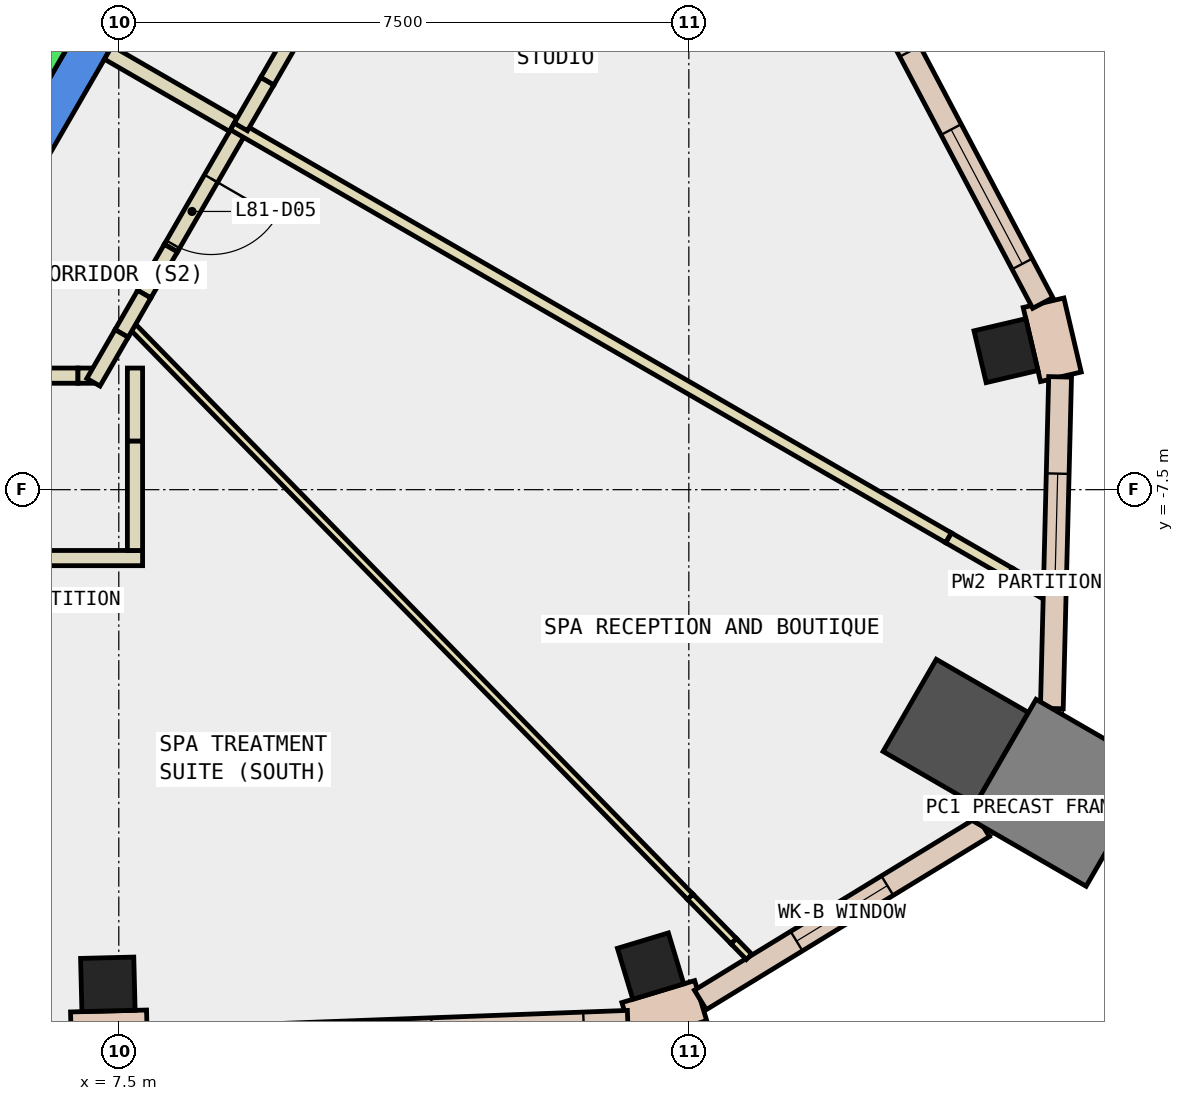
"""IFC4 building model, lengths in metres.
Left out: names, types, materials, properties, quantities, classifications, styles, units other than length and angle.
Written with IfcOpenShell. Run it as: python <this file> out.ifc"""

import sys

from ifc_helpers import new_model, si_unit, direction, frame, frame_2d, origin, origin_2d, place, context, subcontext, project, spatial, polyline, rectangle, outline, extrude, element, fill, save


model = new_model("IFC4")
c1 = context("Model", 3, precision=1e-05, world=origin(), true_north=direction((0.0, 1.0)))
c2 = subcontext(c1, "Body", "Model", "MODEL_VIEW")
j1 = project(units=[si_unit("LENGTHUNIT", "METRE"), si_unit("PLANEANGLEUNIT", "RADIAN")], contexts=[c1])
p1 = place(None, origin())
s1 = spatial("IfcSite", under=j1, at=p1, CompositionType="ELEMENT")
p2 = place(p1, origin())
s2 = spatial("IfcBuilding", under=s1, at=p2, CompositionType="ELEMENT")
p3 = place(p2, frame((0.0, 0.0, 344.9)))
s3 = spatial("IfcBuildingStorey", under=s2, at=p3, CompositionType="ELEMENT", Elevation=344.9)
for number, where, z_axis, x_axis in (
    (1, (7.356, -14.008, -0.35), (0.0, 0.0, 1.0), (1.0, 0.025, 0.0)),
    (2, (14.497, -13.768, -0.35), (0.0, 0.0, 1.0), (0.957, 0.289, 0.0)),
):
    element("IfcColumn", number, at=place(p3, frame(where, z_axis=z_axis, x_axis=x_axis)), inside=s3, PredefinedType="COLUMN", context=c2, shape_type="SweptSolid", body=[
        extrude(rectangle(XDim=0.7, YDim=0.7, at=origin_2d()), origin(), (0.0, 0.0, 1.0), 4.4),
    ])
p4 = place(p3, frame((18.512, -10.688, -0.35), z_axis=(0.0, 0.0, 1.0), x_axis=(-0.866025403784, 0.5, 0.0)))
e3 = element("IfcColumn", 3, at=p4, inside=s3, PredefinedType="COLUMN", context=c2, shape_type="SweptSolid", body=[
    extrude(rectangle(XDim=1.4, YDim=1.4, at=origin_2d()), origin(), (0.0, 0.0, 1.0), 4.4),
])
p5 = place(p3, frame((19.173, -5.671, -0.35), z_axis=(0.0, 0.0, 1.0), x_axis=(-0.228435830028, 0.973558971793, 0.0)))
e4 = element("IfcColumn", 4, at=p5, inside=s3, PredefinedType="COLUMN", context=c2, shape_type="SweptSolid", body=[
    extrude(rectangle(XDim=0.7, YDim=0.7, at=origin_2d()), origin(), (0.0, 0.0, 1.0), 4.4),
])
p6 = place(p3, frame((19.898, -11.488, -0.35), z_axis=(0.0, 0.0, 1.0), x_axis=(-0.866025403784, 0.5, 0.0)))
e5 = element("IfcColumn", 5, at=p6, inside=s3, PredefinedType="COLUMN", context=c2, shape_type="SweptSolid", body=[
    extrude(rectangle(XDim=1.8, YDim=1.8, at=origin_2d()), origin(), (0.0, 0.0, 1.0), 4.4),
])
p7 = place(p3, frame((0.0, 0.0, -0.35)))
e6 = element("IfcWall", 6, at=p7, inside=s3, PredefinedType="SHEAR", context=c2, shape_type="SweptSolid", body=[
    extrude(outline(polyline([(4.907, -6.0), (9.815, 2.5), (9.238, 2.5), (4.619, -5.5), (4.907, -6.0)])), origin(), (0.0, 0.0, 1.0), 4.4),
])
for number, where, z_axis, x_axis in (
    (7, (19.895, -6.015, 0.0), (0.0, 0.0, 1.0), (-0.228, 0.974, 0.0)),
    (8, (6.872, -14.646, 0.0), (0.0, 0.0, 1.0), (1.0, 0.025, 0.0)),
):
    element("IfcWall", number, at=place(p3, frame(where, z_axis=z_axis, x_axis=x_axis)), inside=s3, PredefinedType="STANDARD", context=c2, shape_type="SweptSolid", body=[
        extrude(rectangle(XDim=1.0, YDim=0.55, at=frame_2d((0.5, 0.0))), origin(), (0.0, 0.0, 1.0), 4.05),
    ])
p8 = place(p3, frame((14.199, -14.511, 0.0), z_axis=(0.0, 0.0, 1.0), x_axis=(0.957286907321, 0.289139718946, 0.0)))
e9 = element("IfcWall", 9, at=p8, inside=s3, PredefinedType="STANDARD", context=c2, shape_type="SweptSolid", body=[
    extrude(rectangle(XDim=1.0, YDim=0.55, at=frame_2d((0.5, 0.0))), origin(), (0.0, 0.0, 1.0), 4.05),
])
p9 = place(p3, frame((7.874, -14.739, 0.0), z_axis=(0.0, 0.0, 1.0), x_axis=(0.999292132587, 0.03761959262, 0.0)))
e10 = element("IfcWall", 10, at=p9, inside=s3, PredefinedType="STANDARD", context=c2, shape_type="SweptSolid", body=[
    extrude(rectangle(XDim=6.327, YDim=0.3, at=frame_2d((3.164, 0.0))), origin(), (0.0, 0.0, 1.0), 4.05),
])
p10 = place(p9, frame((0.582, 0.0, 0.9)))
e11 = element("IfcOpeningElement", 11, at=p10, cuts=e10, PredefinedType="OPENING", context=c2, shape_type="SweptSolid", body=[
    extrude(rectangle(XDim=2.0, YDim=3.0, at=frame_2d((1.0, 1.5))), frame((0.0, 0.16, 0.0), z_axis=(0.0, -1.0, 0.0), x_axis=(1.0, 0.0, 0.0)), (0.0, 0.0, 1.0), 0.32),
])
p11 = place(p9, frame((3.746, 0.0, 0.9)))
e12 = element("IfcOpeningElement", 12, at=p11, cuts=e10, PredefinedType="OPENING", context=c2, shape_type="SweptSolid", body=[
    extrude(rectangle(XDim=2.0, YDim=3.0, at=frame_2d((1.0, 1.5))), frame((0.0, 0.16, 0.0), z_axis=(0.0, -1.0, 0.0), x_axis=(1.0, 0.0, 0.0)), (0.0, 0.0, 1.0), 0.32),
])
p12 = place(p3, frame((15.152, -14.213, 0.0), z_axis=(0.0, 0.0, 1.0), x_axis=(0.853225151066, 0.521542751448, 0.0)))
e13 = element("IfcWall", 13, at=p12, inside=s3, PredefinedType="STANDARD", context=c2, shape_type="SweptSolid", body=[
    extrude(rectangle(XDim=4.366, YDim=0.3, at=frame_2d((2.183, 0.0))), origin(), (0.0, 0.0, 1.0), 4.05),
])
p13 = place(p12, frame((1.483, 0.0, 0.9)))
e14 = element("IfcOpeningElement", 14, at=p13, cuts=e13, PredefinedType="OPENING", context=c2, shape_type="SweptSolid", body=[
    extrude(rectangle(XDim=1.4, YDim=3.0, at=frame_2d((0.7, 1.5))), frame((0.0, 0.16, 0.0), z_axis=(0.0, -1.0, 0.0), x_axis=(1.0, 0.0, 0.0)), (0.0, 0.0, 1.0), 0.32),
])
p14 = place(p3, frame((19.776, -10.379, 0.0), z_axis=(0.0, 0.0, 1.0), x_axis=(0.025006167975, 0.99968729689, 0.0)))
e15 = element("IfcWall", 15, at=p14, inside=s3, PredefinedType="STANDARD", context=c2, shape_type="SweptSolid", body=[
    extrude(rectangle(XDim=4.364, YDim=0.3, at=frame_2d((2.182, 0.0))), origin(), (0.0, 0.0, 1.0), 4.05),
])
p15 = place(p14, frame((1.691, 0.0, 0.9)))
e16 = element("IfcOpeningElement", 16, at=p15, cuts=e15, PredefinedType="OPENING", context=c2, shape_type="SweptSolid", body=[
    extrude(rectangle(XDim=1.4, YDim=3.0, at=frame_2d((0.7, 1.5))), frame((0.0, 0.16, 0.0), z_axis=(0.0, -1.0, 0.0), x_axis=(1.0, 0.0, 0.0)), (0.0, 0.0, 1.0), 0.32),
])
p16 = place(p3, frame((19.657, -5.044, 0.0), z_axis=(0.0, 0.0, 1.0), x_axis=(-0.467155191513, 0.884175337274, 0.0)))
e17 = element("IfcWall", 17, at=p16, inside=s3, PredefinedType="STANDARD", context=c2, shape_type="SweptSolid", body=[
    extrude(rectangle(XDim=6.326, YDim=0.3, at=frame_2d((3.163, 0.0))), origin(), (0.0, 0.0, 1.0), 4.05),
])
p17 = place(p16, frame((0.581, 0.0, 0.9)))
e18 = element("IfcOpeningElement", 18, at=p17, cuts=e17, PredefinedType="OPENING", context=c2, shape_type="SweptSolid", body=[
    extrude(rectangle(XDim=2.0, YDim=3.0, at=frame_2d((1.0, 1.5))), frame((0.0, 0.16, 0.0), z_axis=(0.0, -1.0, 0.0), x_axis=(1.0, 0.0, 0.0)), (0.0, 0.0, 1.0), 0.32),
])
p18 = place(p16, frame((3.744, 0.0, 0.9)))
e19 = element("IfcOpeningElement", 19, at=p18, cuts=e17, PredefinedType="OPENING", context=c2, shape_type="SweptSolid", body=[
    extrude(rectangle(XDim=2.0, YDim=3.0, at=frame_2d((1.0, 1.5))), frame((0.0, 0.16, 0.0), z_axis=(0.0, -1.0, 0.0), x_axis=(1.0, 0.0, 0.0)), (0.0, 0.0, 1.0), 0.32),
])
p19 = place(p3, frame((7.813, -8.4, 0.0), z_axis=(0.0, 0.0, 1.0), x_axis=(-1.0, 0.0, 0.0)))
e20 = element("IfcWall", 20, at=p19, inside=s3, PredefinedType="PARTITIONING", context=c2, shape_type="SweptSolid", body=[
    extrude(rectangle(XDim=2.567, YDim=0.2, at=frame_2d((1.283, 0.0))), origin(), (0.0, 0.0, 1.0), 4.05),
])
p20 = place(p19, frame((1.489, 0.0, 0.0)))
e21 = element("IfcOpeningElement", 21, at=p20, cuts=e20, PredefinedType="OPENING", context=c2, shape_type="SweptSolid", body=[
    extrude(rectangle(XDim=1.0, YDim=2.1, at=frame_2d((0.5, 1.05))), frame((0.0, 0.11, 0.0), z_axis=(0.0, -1.0, 0.0), x_axis=(1.0, 0.0, 0.0)), (0.0, 0.0, 1.0), 0.22),
])
p21 = place(p3, frame((7.713, -5.9, 0.0), z_axis=(0.0, 0.0, 1.0), x_axis=(0.0, -1.0, 0.0)))
e22 = element("IfcWall", 22, at=p21, inside=s3, PredefinedType="PARTITIONING", context=c2, shape_type="SweptSolid", body=[
    extrude(rectangle(XDim=0.962, YDim=0.2, at=frame_2d((0.481, 0.0))), origin(), (0.0, 0.0, 1.0), 1.95),
])
p22 = place(p3, frame((9.106, -2.728, 0.0), z_axis=(0.0, 0.0, 1.0), x_axis=(-0.500246664097, -0.865882945357, 0.0)))
e23 = element("IfcWall", 23, at=p22, inside=s3, PredefinedType="PARTITIONING", context=c2, shape_type="SweptSolid", body=[
    extrude(rectangle(XDim=1.841, YDim=0.2, at=frame_2d((0.92, 0.0))), origin(), (0.0, 0.0, 1.0), 4.05),
])
p23 = place(p22, frame((0.784, 0.0, 0.0)))
e24 = element("IfcOpeningElement", 24, at=p23, cuts=e23, PredefinedType="OPENING", context=c2, shape_type="SweptSolid", body=[
    extrude(rectangle(XDim=1.0, YDim=2.1, at=frame_2d((0.5, 1.05))), frame((0.0, 0.11, 0.0), z_axis=(0.0, -1.0, 0.0), x_axis=(1.0, 0.0, 0.0)), (0.0, 0.0, 1.0), 0.22),
])
p24 = place(p3, frame((7.361, -1.75, 0.0), z_axis=(0.0, 0.0, 1.0), x_axis=(0.865980106173, -0.500078449558, 0.0)))
e25 = element("IfcWall", 25, at=p24, inside=s3, PredefinedType="PARTITIONING", context=c2, shape_type="SweptSolid", body=[
    extrude(rectangle(XDim=1.9, YDim=0.2, at=frame_2d((0.95, 0.0))), origin(), (0.0, 0.0, 1.0), 4.05),
])
p25 = place(p3, frame((7.624, -5.295, 0.0), z_axis=(0.0, 0.0, 1.0), x_axis=(0.699214658751, -0.714911785458, 0.0)))
e26 = element("IfcWall", 26, at=p25, inside=s3, PredefinedType="PARTITIONING", context=c2, shape_type="SweptSolid", body=[
    extrude(rectangle(XDim=10.576, YDim=0.1, at=frame_2d((5.288, 0.0))), origin(), (0.0, 0.0, 1.0), 4.05),
])
p26 = place(p3, frame((19.664, -8.853, 0.0), z_axis=(0.0, 0.0, 1.0), x_axis=(-0.866272785837, 0.499571276714, 0.0)))
e27 = element("IfcWall", 27, at=p26, inside=s3, PredefinedType="PARTITIONING", context=c2, shape_type="SweptSolid", body=[
    extrude(rectangle(XDim=0.513, YDim=0.15, at=frame_2d((0.256, 0.0))), origin(), (0.0, 0.0, 1.0), 4.05),
])
p27 = place(p3, frame((5.076, -6.0, 0.0), z_axis=(0.0, 0.0, 1.0), x_axis=(1.0, 0.0, 0.0)))
e28 = element("IfcWall", 28, at=p27, inside=s3, PredefinedType="PARTITIONING", context=c2, shape_type="SweptSolid", body=[
    extrude(rectangle(XDim=1.887, YDim=0.2, at=frame_2d((0.943, 0.0))), origin(), (0.0, 0.0, 1.0), 4.05),
])
p28 = place(p27, frame((0.336, 0.0, 0.0)))
e29 = element("IfcOpeningElement", 29, at=p28, cuts=e28, PredefinedType="OPENING", context=c2, shape_type="SweptSolid", body=[
    extrude(rectangle(XDim=1.0, YDim=2.1, at=frame_2d((0.5, 1.05))), frame((0.0, 0.11, 0.0), z_axis=(0.0, -1.0, 0.0), x_axis=(1.0, 0.0, 0.0)), (0.0, 0.0, 1.0), 0.22),
])
p29 = place(p3, frame((6.963, -6.0, 0.0), z_axis=(0.0, 0.0, 1.0), x_axis=(1.0, 0.0, 0.0)))
e30 = element("IfcWall", 30, at=p29, inside=s3, PredefinedType="PARTITIONING", context=c2, shape_type="SweptSolid", body=[
    extrude(rectangle(XDim=0.198, YDim=0.2, at=frame_2d((0.099, 0.0))), origin(), (0.0, 0.0, 1.0), 1.95),
])
p30 = place(p3, frame((7.713, -6.862, 0.0), z_axis=(0.0, 0.0, 1.0), x_axis=(0.0, -1.0, 0.0)))
e31 = element("IfcWall", 31, at=p30, inside=s3, PredefinedType="PARTITIONING", context=c2, shape_type="SweptSolid", body=[
    extrude(rectangle(XDim=1.438, YDim=0.2, at=frame_2d((0.719, 0.0))), origin(), (0.0, 0.0, 1.0), 4.05),
])
p31 = place(p3, frame((8.185, -4.322, 0.0), z_axis=(0.0, 0.0, 1.0), x_axis=(-0.500265973451, -0.865871789474, 0.0)))
e32 = element("IfcWall", 32, at=p31, inside=s3, PredefinedType="PARTITIONING", context=c2, shape_type="SweptSolid", body=[
    extrude(rectangle(XDim=0.7, YDim=0.2, at=frame_2d((0.35, 0.0))), origin(), (0.0, 0.0, 1.0), 1.95),
])
p32 = place(p3, frame((7.835, -4.928, 0.0), z_axis=(0.0, 0.0, 1.0), x_axis=(-0.499132035552, -0.866525943689, 0.0)))
e33 = element("IfcWall", 33, at=p32, inside=s3, PredefinedType="PARTITIONING", context=c2, shape_type="SweptSolid", body=[
    extrude(rectangle(XDim=0.597, YDim=0.2, at=frame_2d((0.298, 0.0))), origin(), (0.0, 0.0, 1.0), 4.05),
])
p33 = place(p3, frame((7.537, -5.445, 0.0), z_axis=(0.0, 0.0, 1.0), x_axis=(-0.500529943435, -0.865719224533, 0.0)))
e34 = element("IfcWall", 34, at=p33, inside=s3, PredefinedType="PARTITIONING", context=c2, shape_type="SweptSolid", body=[
    extrude(rectangle(XDim=0.741, YDim=0.2, at=frame_2d((0.371, 0.0))), origin(), (0.0, 0.0, 1.0), 1.95),
])
p34 = place(p3, frame((15.019, -12.856, 0.0), z_axis=(0.0, 0.0, 1.0), x_axis=(0.699751841197, -0.714386002622, 0.0)))
e35 = element("IfcWall", 35, at=p34, inside=s3, PredefinedType="PARTITIONING", context=c2, shape_type="SweptSolid", body=[
    extrude(rectangle(XDim=0.817, YDim=0.1, at=frame_2d((0.409, 0.0))), origin(), (0.0, 0.0, 1.0), 1.95),
])
p35 = place(p3, frame((15.591, -13.44, 0.0), z_axis=(0.0, 0.0, 1.0), x_axis=(0.698143623014, -0.715957737332, 0.0)))
e36 = element("IfcWall", 36, at=p35, inside=s3, PredefinedType="PARTITIONING", context=c2, shape_type="SweptSolid", body=[
    extrude(rectangle(XDim=0.288, YDim=0.1, at=frame_2d((0.144, 0.0))), origin(), (0.0, 0.0, 1.0), 4.05),
])
p36 = place(p3, frame((19.22, -8.597, 0.0), z_axis=(0.0, 0.0, 1.0), x_axis=(-0.866163690229, 0.499760404323, 0.0)))
e37 = element("IfcWall", 37, at=p36, inside=s3, PredefinedType="PARTITIONING", context=c2, shape_type="SweptSolid", body=[
    extrude(rectangle(XDim=0.928, YDim=0.15, at=frame_2d((0.464, 0.0))), origin(), (0.0, 0.0, 1.0), 1.95),
])
p37 = place(p3, frame((18.416, -8.133, 0.0), z_axis=(0.0, 0.0, 1.0), x_axis=(-0.866013839597, 0.500020029225, 0.0)))
e38 = element("IfcWall", 38, at=p37, inside=s3, PredefinedType="PARTITIONING", context=c2, shape_type="SweptSolid", body=[
    extrude(rectangle(XDim=10.866, YDim=0.15, at=frame_2d((5.433, 0.0))), origin(), (0.0, 0.0, 1.0), 4.05),
])
p38 = place(p3, frame((9.815, -1.499, 0.0), z_axis=(0.0, 0.0, 1.0), x_axis=(-0.499508606083, -0.866308924373, 0.0)))
e39 = element("IfcWall", 39, at=p38, inside=s3, PredefinedType="PARTITIONING", context=c2, shape_type="SweptSolid", body=[
    extrude(rectangle(XDim=0.725, YDim=0.2, at=frame_2d((0.362, 0.0))), origin(), (0.0, 0.0, 1.0), 1.95),
])
p39 = place(p3, frame((9.453, -2.127, 0.0), z_axis=(0.0, 0.0, 1.0), x_axis=(-0.499884866553, -0.866091865907, 0.0)))
e40 = element("IfcWall", 40, at=p39, inside=s3, PredefinedType="PARTITIONING", context=c2, shape_type="SweptSolid", body=[
    extrude(rectangle(XDim=0.694, YDim=0.2, at=frame_2d((0.347, 0.0))), origin(), (0.0, 0.0, 1.0), 4.05),
])
p40 = place(p3, frame((5.492, -3.788, 0.0), z_axis=(0.0, 0.0, 1.0), x_axis=(0.500034260056, 0.866005622828, 0.0)))
e41 = element("IfcWall", 41, at=p40, inside=s3, PredefinedType="STANDARD", context=c2, shape_type="SweptSolid", body=[
    extrude(rectangle(XDim=5.399, YDim=0.2, at=frame_2d((2.7, 0.0))), origin(), (0.0, 0.0, 1.0), 4.05),
])
p41 = place(p11, origin())
e42 = element("IfcWindow", 42, at=p41, inside=s3, PartitioningType="SINGLE_PANEL", PredefinedType="WINDOW", context=c2, shape_type="SweptSolid", body=[
    extrude(rectangle(XDim=2.0, YDim=3.0, at=frame_2d((1.0, 1.5))), frame((0.0, 0.03, 0.0), z_axis=(0.0, -1.0, 0.0), x_axis=(1.0, 0.0, 0.0)), (0.0, 0.0, 1.0), 0.06),
])
fill(e12, e42)
p42 = place(p13, origin())
e43 = element("IfcWindow", 43, at=p42, inside=s3, PartitioningType="SINGLE_PANEL", PredefinedType="WINDOW", context=c2, shape_type="SweptSolid", body=[
    extrude(rectangle(XDim=1.4, YDim=3.0, at=frame_2d((0.7, 1.5))), frame((0.0, 0.03, 0.0), z_axis=(0.0, -1.0, 0.0), x_axis=(1.0, 0.0, 0.0)), (0.0, 0.0, 1.0), 0.06),
])
fill(e14, e43)
p43 = place(p15, origin())
e44 = element("IfcWindow", 44, at=p43, inside=s3, PartitioningType="SINGLE_PANEL", PredefinedType="WINDOW", context=c2, shape_type="SweptSolid", body=[
    extrude(rectangle(XDim=1.4, YDim=3.0, at=frame_2d((0.7, 1.5))), frame((0.0, 0.03, 0.0), z_axis=(0.0, -1.0, 0.0), x_axis=(1.0, 0.0, 0.0)), (0.0, 0.0, 1.0), 0.06),
])
fill(e16, e44)
p44 = place(p17, origin())
e45 = element("IfcWindow", 45, at=p44, inside=s3, PartitioningType="SINGLE_PANEL", PredefinedType="WINDOW", context=c2, shape_type="SweptSolid", body=[
    extrude(rectangle(XDim=2.0, YDim=3.0, at=frame_2d((1.0, 1.5))), frame((0.0, 0.03, 0.0), z_axis=(0.0, -1.0, 0.0), x_axis=(1.0, 0.0, 0.0)), (0.0, 0.0, 1.0), 0.06),
])
fill(e18, e45)
p45 = place(p23, origin())
e46 = element("IfcDoor", 46, at=p45, inside=s3, OperationType="SINGLE_SWING_LEFT", PredefinedType="DOOR", context=c2, shape_type="SweptSolid", body=[
    extrude(rectangle(XDim=1.0, YDim=2.1, at=frame_2d((0.5, 1.05))), frame((0.0, 0.025, 0.0), z_axis=(0.0, -1.0, 0.0), x_axis=(1.0, 0.0, 0.0)), (0.0, 0.0, 1.0), 0.05),
])
fill(e24, e46)
save(model, sys.argv[1])
